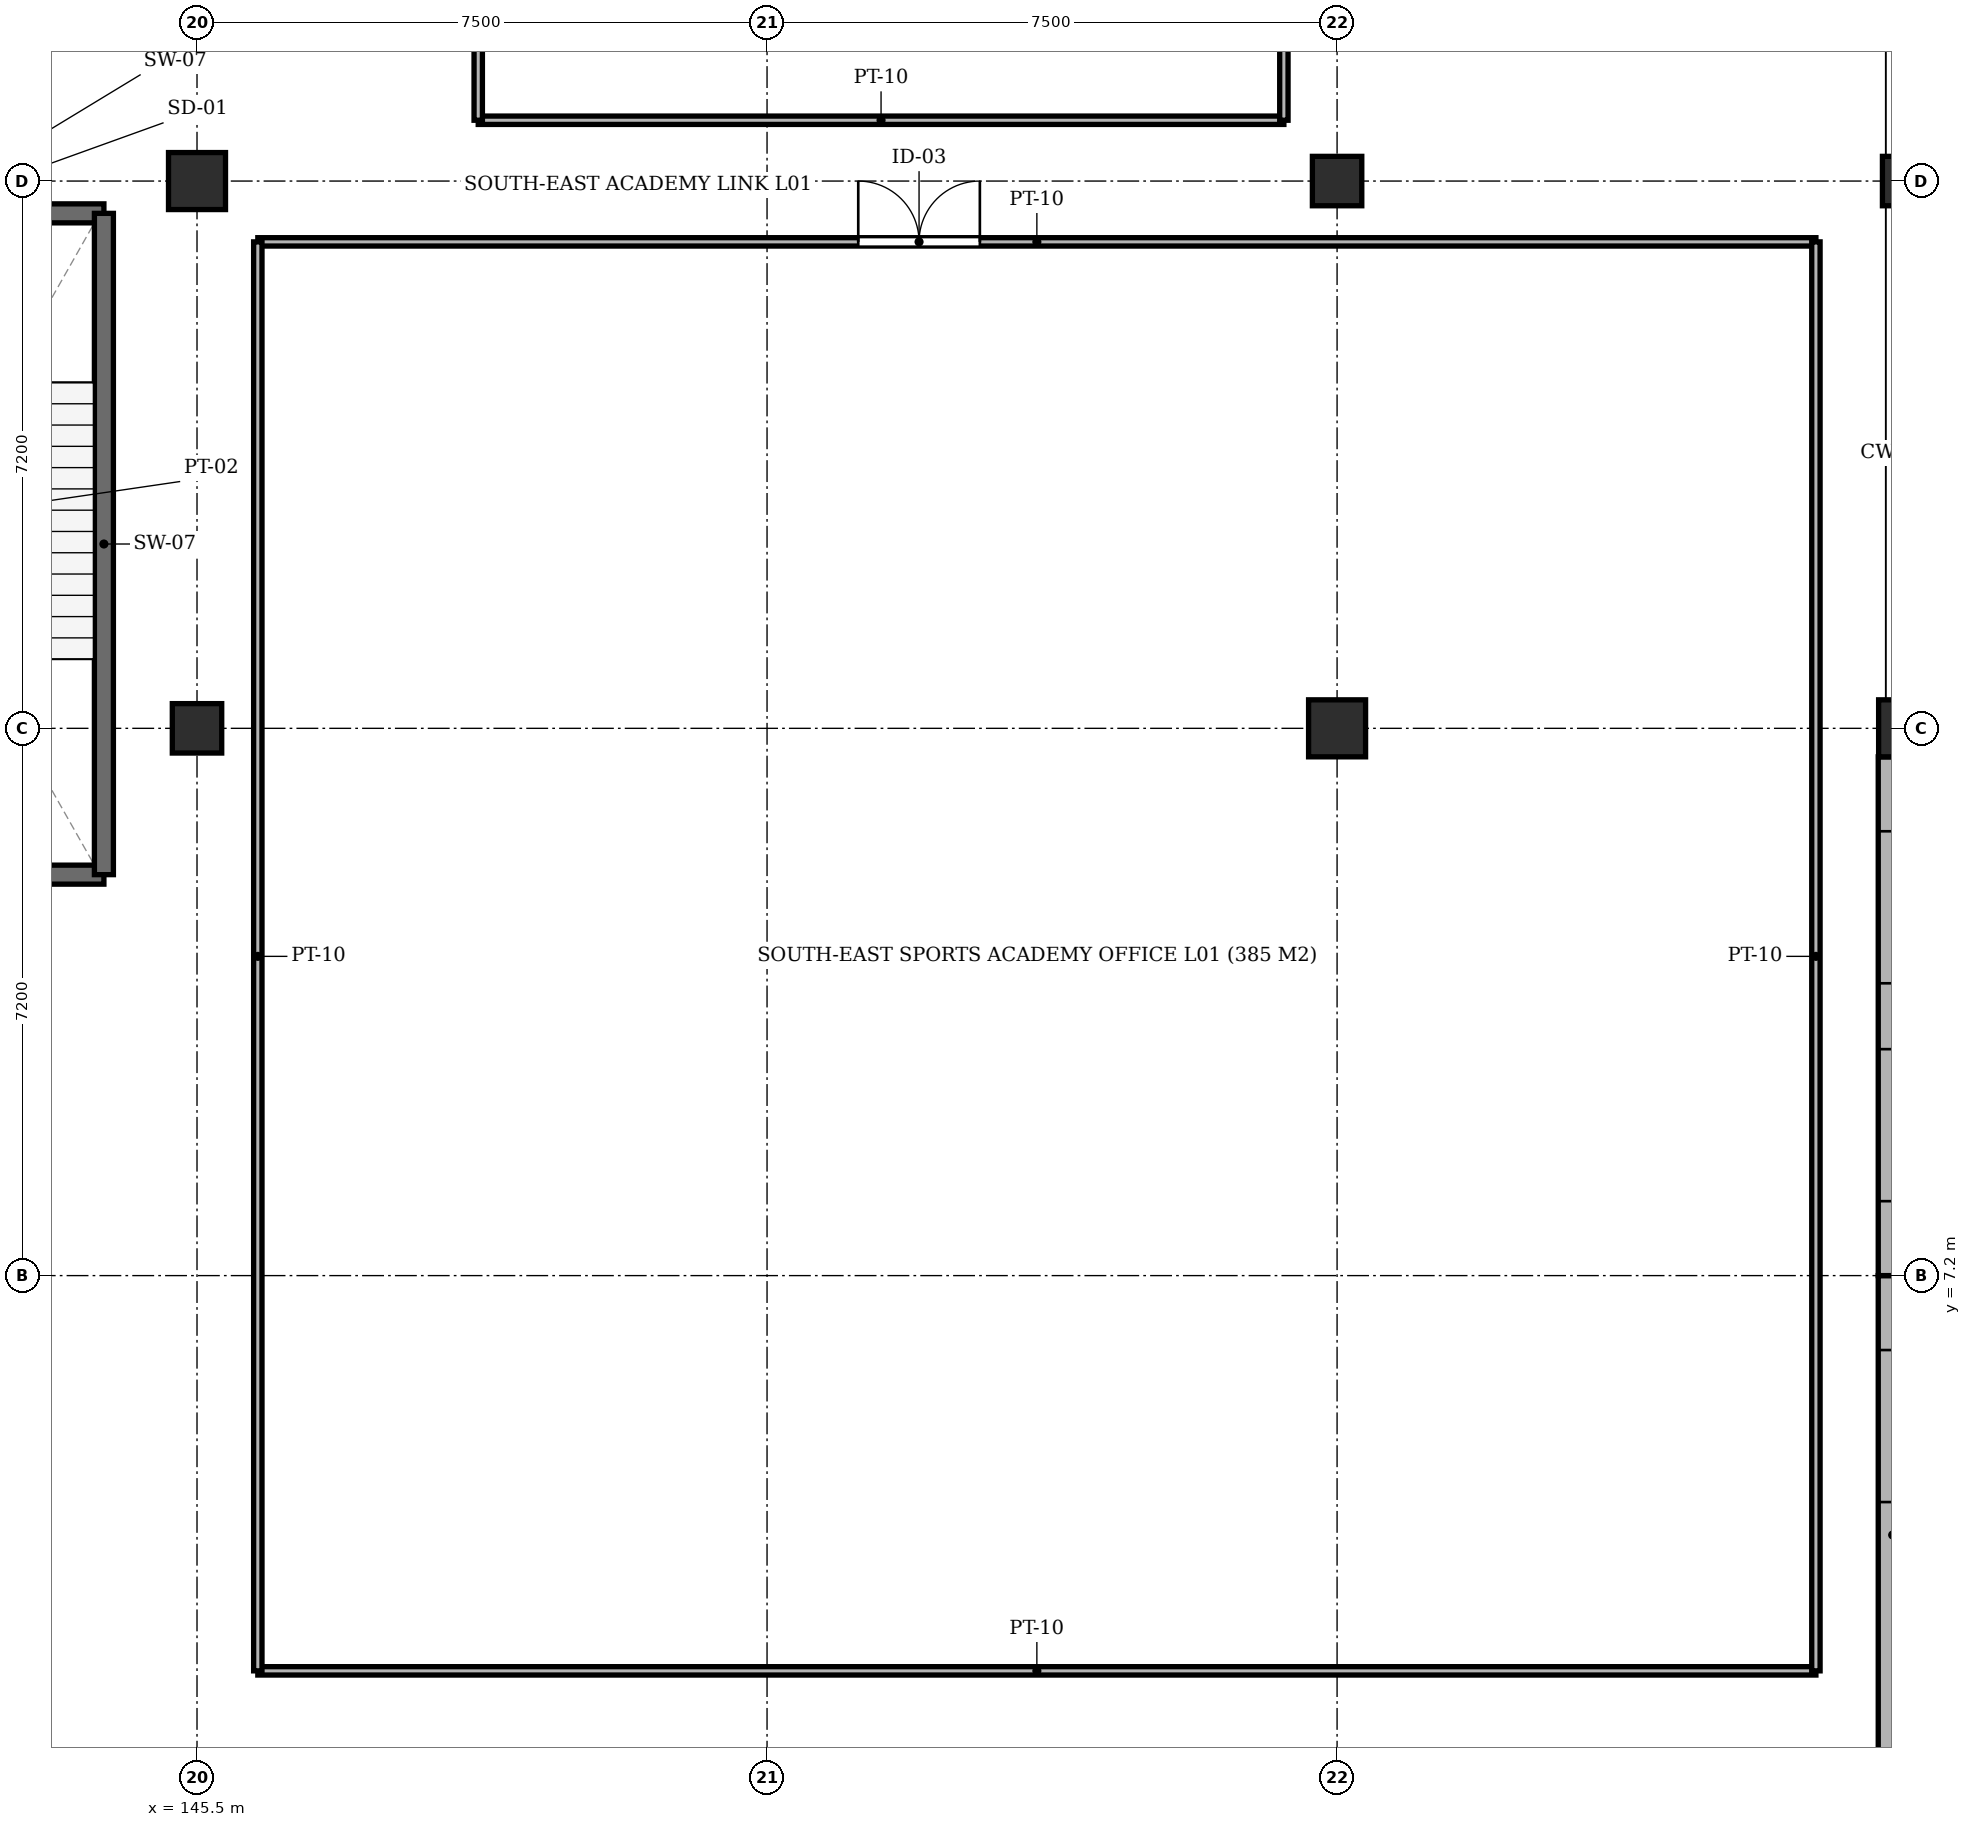
"""IFC4 building model, lengths in metres.
Left out: names, types, materials, properties, quantities, classifications, styles, units other than length and angle.
Written with IfcOpenShell. Run it as: python <this file> out.ifc"""

import sys

from ifc_helpers import new_model, si_unit, direction, frame, frame_2d, origin, origin_2d, place, context, subcontext, project, spatial, rectangle, extrude, element, fill, save


model = new_model("IFC4")
c1 = context("Model", 3, precision=1e-05, world=origin(), true_north=direction((0.0, 1.0)))
c2 = subcontext(c1, "Body", "Model", "MODEL_VIEW")
j1 = project(units=[si_unit("LENGTHUNIT", "METRE"), si_unit("PLANEANGLEUNIT", "RADIAN")], contexts=[c1])
p1 = place(None, origin())
s1 = spatial("IfcSite", under=j1, at=p1, CompositionType="ELEMENT")
p2 = place(p1, origin())
s2 = spatial("IfcBuilding", under=s1, at=p2, CompositionType="ELEMENT")
p3 = place(p2, frame((0.0, 0.0, 4.6)))
s3 = spatial("IfcBuildingStorey", under=s2, at=p3, CompositionType="ELEMENT", Elevation=4.6)
p4 = place(p3, frame((145.5, 14.4, -0.3), z_axis=(0.0, 0.0, 1.0), x_axis=(1.0, 0.0, 0.0)))
e1 = element("IfcColumn", 1, at=p4, inside=s3, PredefinedType="COLUMN", context=c2, shape_type="SweptSolid", body=[
    extrude(rectangle(XDim=0.65, YDim=0.65, at=origin_2d()), origin(), (0.0, 0.0, 1.0), 4.65),
])
for number, where, z_axis, x_axis in (
    (2, (145.5, 21.6, -0.3), (0.0, 0.0, 1.0), (1.0, 0.0, 0.0)),
    (3, (160.5, 14.4, -0.3), (0.0, 0.0, 1.0), (1.0, 0.0, 0.0)),
):
    element("IfcColumn", number, at=place(p3, frame(where, z_axis=z_axis, x_axis=x_axis)), inside=s3, PredefinedType="COLUMN", context=c2, shape_type="SweptSolid", body=[
        extrude(rectangle(XDim=0.75, YDim=0.75, at=origin_2d()), origin(), (0.0, 0.0, 1.0), 4.65),
    ])
p5 = place(p3, frame((160.5, 21.6, -0.3), z_axis=(0.0, 0.0, 1.0), x_axis=(1.0, 0.0, 0.0)))
e4 = element("IfcColumn", 4, at=p5, inside=s3, PredefinedType="COLUMN", context=c2, shape_type="SweptSolid", body=[
    extrude(rectangle(XDim=0.65, YDim=0.65, at=origin_2d()), origin(), (0.0, 0.0, 1.0), 4.65),
])
p6 = place(p3, frame((168.0, 14.4, -0.3), z_axis=(0.0, 0.0, 1.0), x_axis=(1.0, 0.0, 0.0)))
e5 = element("IfcColumn", 5, at=p6, inside=s3, PredefinedType="COLUMN", context=c2, shape_type="SweptSolid", body=[
    extrude(rectangle(XDim=0.75, YDim=0.75, at=origin_2d()), origin(), (0.0, 0.0, 1.0), 4.65),
])
p7 = place(p3, frame((168.0, 21.6, -0.3), z_axis=(0.0, 0.0, 1.0), x_axis=(1.0, 0.0, 0.0)))
e6 = element("IfcColumn", 6, at=p7, inside=s3, PredefinedType="COLUMN", context=c2, shape_type="SweptSolid", body=[
    extrude(rectangle(XDim=0.65, YDim=0.65, at=origin_2d()), origin(), (0.0, 0.0, 1.0), 4.65),
])
p8 = place(p3, frame((167.81, 0.375, 0.0), z_axis=(0.0, 0.0, 1.0), x_axis=(0.0, 1.0, 0.0)))
e7 = element("IfcWall", 7, at=p8, inside=s3, PredefinedType="SOLIDWALL", context=c2, shape_type="SweptSolid", body=[
    extrude(rectangle(XDim=6.825, YDim=0.38, at=frame_2d((3.413, 0.0))), origin(), (0.0, 0.0, 1.0), 3.65),
])
p9 = place(p8, frame((3.846, 0.0, 0.92)))
e8 = element("IfcOpeningElement", 8, at=p9, cuts=e7, PredefinedType="OPENING", context=c2, shape_type="SweptSolid", body=[
    extrude(rectangle(XDim=2.0, YDim=2.3, at=frame_2d((1.0, 1.15))), frame((0.0, 0.202, 0.0), z_axis=(0.0, -1.0, 0.0), x_axis=(1.0, 0.0, 0.0)), (0.0, 0.0, 1.0), 0.404),
])
p10 = place(p3, frame((167.81, 7.2, 0.0), z_axis=(0.0, 0.0, 1.0), x_axis=(0.0, 1.0, 0.0)))
e9 = element("IfcWall", 9, at=p10, inside=s3, PredefinedType="SOLIDWALL", context=c2, shape_type="SweptSolid", body=[
    extrude(rectangle(XDim=6.825, YDim=0.38, at=frame_2d((3.413, 0.0))), origin(), (0.0, 0.0, 1.0), 3.65),
])
p11 = place(p10, frame((0.979, 0.0, 0.92)))
e10 = element("IfcOpeningElement", 10, at=p11, cuts=e9, PredefinedType="OPENING", context=c2, shape_type="SweptSolid", body=[
    extrude(rectangle(XDim=2.0, YDim=2.3, at=frame_2d((1.0, 1.15))), frame((0.0, 0.202, 0.0), z_axis=(0.0, -1.0, 0.0), x_axis=(1.0, 0.0, 0.0)), (0.0, 0.0, 1.0), 0.404),
])
p12 = place(p10, frame((3.846, 0.0, 0.92)))
e11 = element("IfcOpeningElement", 11, at=p12, cuts=e9, PredefinedType="OPENING", context=c2, shape_type="SweptSolid", body=[
    extrude(rectangle(XDim=2.0, YDim=2.3, at=frame_2d((1.0, 1.15))), frame((0.0, 0.202, 0.0), z_axis=(0.0, -1.0, 0.0), x_axis=(1.0, 0.0, 0.0)), (0.0, 0.0, 1.0), 0.404),
])
p13 = place(p3, frame((139.225, 12.475, 0.0), z_axis=(0.0, 0.0, 1.0), x_axis=(1.0, 0.0, 0.0)))
e12 = element("IfcWall", 12, at=p13, inside=s3, PredefinedType="SHEAR", context=c2, shape_type="SweptSolid", body=[
    extrude(rectangle(XDim=5.05, YDim=0.25, at=frame_2d((2.525, 0.0))), origin(), (0.0, 0.0, 1.0), 4.48),
])
p14 = place(p3, frame((144.275, 21.175, 0.0), z_axis=(0.0, 0.0, 1.0), x_axis=(-1.0, 0.0, 0.0)))
e13 = element("IfcWall", 13, at=p14, inside=s3, PredefinedType="SHEAR", context=c2, shape_type="SweptSolid", body=[
    extrude(rectangle(XDim=5.05, YDim=0.25, at=frame_2d((2.525, 0.0))), origin(), (0.0, 0.0, 1.0), 4.48),
])
p15 = place(p14, frame((1.875, 0.0, 0.0)))
e14 = element("IfcOpeningElement", 14, at=p15, cuts=e13, PredefinedType="OPENING", context=c2, shape_type="SweptSolid", body=[
    extrude(rectangle(XDim=1.3, YDim=2.2, at=frame_2d((0.65, 1.1))), frame((0.0, 0.137, 0.0), z_axis=(0.0, -1.0, 0.0), x_axis=(1.0, 0.0, 0.0)), (0.0, 0.0, 1.0), 0.274),
])
p16 = place(p3, frame((144.275, 12.475, 0.0), z_axis=(0.0, 0.0, 1.0), x_axis=(0.0, 1.0, 0.0)))
e15 = element("IfcWall", 15, at=p16, inside=s3, PredefinedType="SHEAR", context=c2, shape_type="SweptSolid", body=[
    extrude(rectangle(XDim=8.7, YDim=0.25, at=frame_2d((4.35, 0.0))), origin(), (0.0, 0.0, 1.0), 4.48),
])
p17 = place(p3, frame((149.2, 22.4, 0.0), z_axis=(0.0, 0.0, 1.0), x_axis=(1.0, 0.0, 0.0)))
e16 = element("IfcWall", 16, at=p17, inside=s3, PredefinedType="PARTITIONING", context=c2, shape_type="SweptSolid", body=[
    extrude(rectangle(XDim=10.6, YDim=0.11, at=frame_2d((5.3, 0.0))), origin(), (0.0, 0.0, 1.0), 4.08),
])
p18 = place(p3, frame((149.2, 22.4, 0.0), z_axis=(0.0, 0.0, 1.0), x_axis=(0.0, 1.0, 0.0)))
e17 = element("IfcWall", 17, at=p18, inside=s3, PredefinedType="PARTITIONING", context=c2, shape_type="SweptSolid", body=[
    extrude(rectangle(XDim=12.4, YDim=0.11, at=frame_2d((6.2, 0.0))), origin(), (0.0, 0.0, 1.0), 4.08),
])
p19 = place(p18, frame((5.675, 0.0, 0.0)))
e18 = element("IfcOpeningElement", 18, at=p19, cuts=e17, PredefinedType="OPENING", context=c2, shape_type="SweptSolid", body=[
    extrude(rectangle(XDim=1.05, YDim=2.15, at=frame_2d((0.525, 1.075))), frame((0.0, 0.067, 0.0), z_axis=(0.0, -1.0, 0.0), x_axis=(1.0, 0.0, 0.0)), (0.0, 0.0, 1.0), 0.134),
])
p20 = place(p3, frame((159.8, 22.4, 0.0), z_axis=(0.0, 0.0, 1.0), x_axis=(0.0, 1.0, 0.0)))
e19 = element("IfcWall", 19, at=p20, inside=s3, PredefinedType="PARTITIONING", context=c2, shape_type="SweptSolid", body=[
    extrude(rectangle(XDim=12.4, YDim=0.11, at=frame_2d((6.2, 0.0))), origin(), (0.0, 0.0, 1.0), 4.08),
])
p21 = place(p3, frame((146.3, 2.0, 0.0), z_axis=(0.0, 0.0, 1.0), x_axis=(1.0, 0.0, 0.0)))
e20 = element("IfcWall", 20, at=p21, inside=s3, PredefinedType="PARTITIONING", context=c2, shape_type="SweptSolid", body=[
    extrude(rectangle(XDim=20.5, YDim=0.11, at=frame_2d((10.25, 0.0))), origin(), (0.0, 0.0, 1.0), 4.08),
])
p22 = place(p3, frame((146.3, 20.8, 0.0), z_axis=(0.0, 0.0, 1.0), x_axis=(1.0, 0.0, 0.0)))
e21 = element("IfcWall", 21, at=p22, inside=s3, PredefinedType="PARTITIONING", context=c2, shape_type="SweptSolid", body=[
    extrude(rectangle(XDim=20.5, YDim=0.11, at=frame_2d((10.25, 0.0))), origin(), (0.0, 0.0, 1.0), 4.08),
])
p23 = place(p22, frame((7.9, 0.0, 0.0)))
e22 = element("IfcOpeningElement", 22, at=p23, cuts=e21, PredefinedType="OPENING", context=c2, shape_type="SweptSolid", body=[
    extrude(rectangle(XDim=1.6, YDim=2.2, at=frame_2d((0.8, 1.1))), frame((0.0, 0.067, 0.0), z_axis=(0.0, -1.0, 0.0), x_axis=(1.0, 0.0, 0.0)), (0.0, 0.0, 1.0), 0.134),
])
for number, where, z_axis, x_axis in (
    (23, (146.3, 2.0, 0.0), (0.0, 0.0, 1.0), (0.0, 1.0, 0.0)),
    (24, (166.8, 2.0, 0.0), (0.0, 0.0, 1.0), (0.0, 1.0, 0.0)),
):
    element("IfcWall", number, at=place(p3, frame(where, z_axis=z_axis, x_axis=x_axis)), inside=s3, PredefinedType="PARTITIONING", context=c2, shape_type="SweptSolid", body=[
        extrude(rectangle(XDim=18.8, YDim=0.11, at=frame_2d((9.4, 0.0))), origin(), (0.0, 0.0, 1.0), 4.08),
    ])
p24 = place(p9, origin())
e25 = element("IfcWindow", 25, at=p24, inside=s3, PartitioningType="SINGLE_PANEL", PredefinedType="WINDOW", context=c2, shape_type="SweptSolid", body=[
    extrude(rectangle(XDim=2.0, YDim=2.3, at=frame_2d((1.0, 1.15))), frame((0.0, 0.03, 0.0), z_axis=(0.0, -1.0, 0.0), x_axis=(1.0, 0.0, 0.0)), (0.0, 0.0, 1.0), 0.06),
])
fill(e8, e25)
p25 = place(p11, origin())
e26 = element("IfcWindow", 26, at=p25, inside=s3, PartitioningType="SINGLE_PANEL", PredefinedType="WINDOW", context=c2, shape_type="SweptSolid", body=[
    extrude(rectangle(XDim=2.0, YDim=2.3, at=frame_2d((1.0, 1.15))), frame((0.0, 0.03, 0.0), z_axis=(0.0, -1.0, 0.0), x_axis=(1.0, 0.0, 0.0)), (0.0, 0.0, 1.0), 0.06),
])
fill(e10, e26)
p26 = place(p12, origin())
e27 = element("IfcWindow", 27, at=p26, inside=s3, PartitioningType="SINGLE_PANEL", PredefinedType="WINDOW", context=c2, shape_type="SweptSolid", body=[
    extrude(rectangle(XDim=2.0, YDim=2.3, at=frame_2d((1.0, 1.15))), frame((0.0, 0.03, 0.0), z_axis=(0.0, -1.0, 0.0), x_axis=(1.0, 0.0, 0.0)), (0.0, 0.0, 1.0), 0.06),
])
fill(e11, e27)
p27 = place(p23, origin())
e28 = element("IfcDoor", 28, at=p27, inside=s3, OperationType="DOUBLE_DOOR_SINGLE_SWING", PredefinedType="DOOR", context=c2, shape_type="SweptSolid", body=[
    extrude(rectangle(XDim=1.6, YDim=2.2, at=frame_2d((0.8, 1.1))), frame((0.0, 0.025, 0.0), z_axis=(0.0, -1.0, 0.0), x_axis=(1.0, 0.0, 0.0)), (0.0, 0.0, 1.0), 0.05),
])
fill(e22, e28)
save(model, sys.argv[1])
